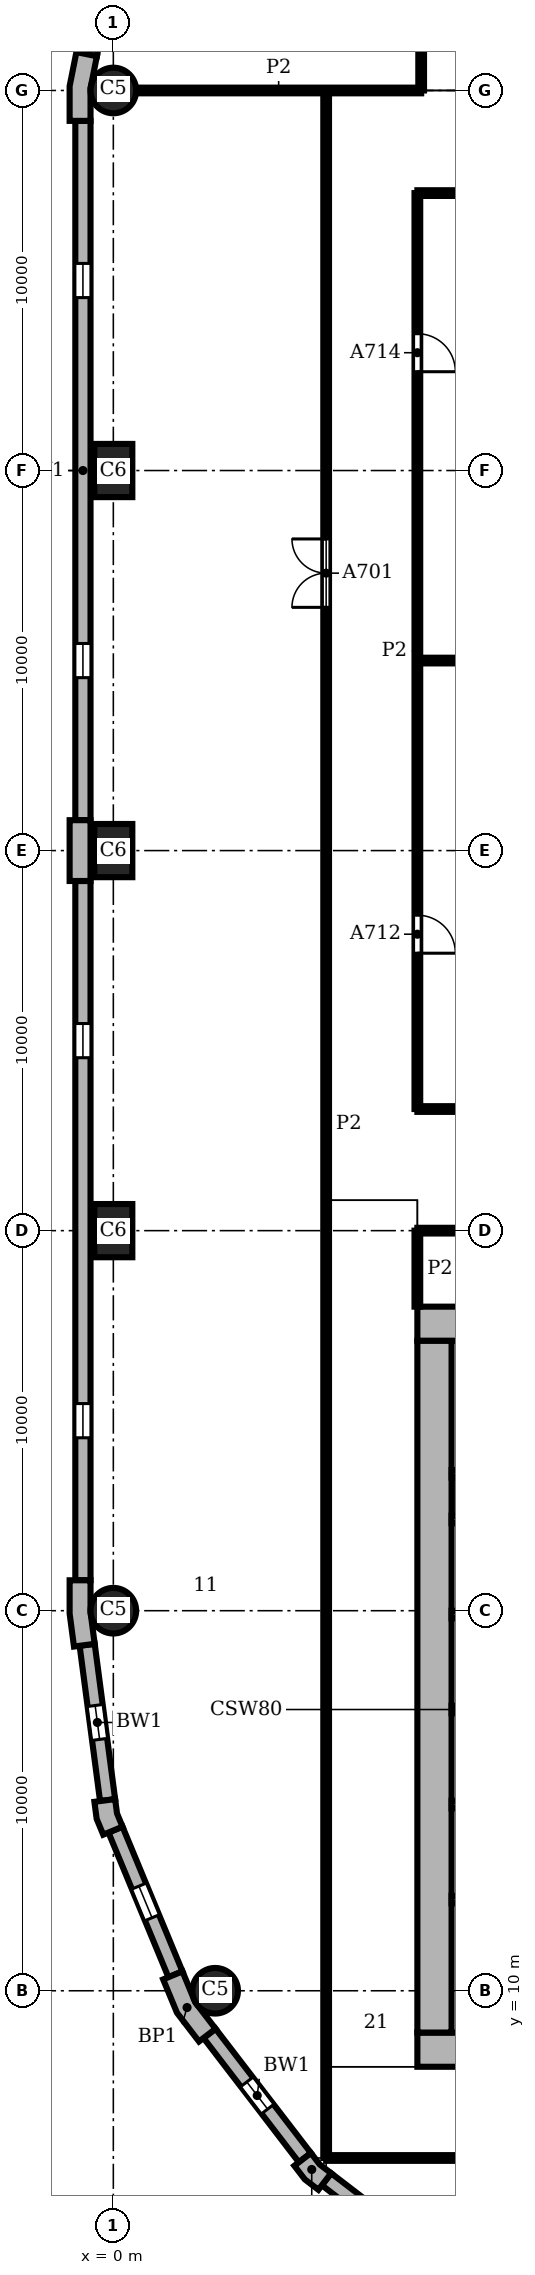
"""IFC4 building model, lengths in metres.
Left out: names, types, materials, properties, quantities, classifications, styles, units other than length and angle.
Written with IfcOpenShell. Run it as: python <this file> out.ifc"""

import sys

from ifc_helpers import new_model, si_unit, direction, frame, frame_2d, origin, origin_2d, place, context, subcontext, project, spatial, polyline, rectangle, circle, outline, extrude, element, fill, save


model = new_model("IFC4")
c1 = context("Model", 3, precision=1e-05, world=origin(), true_north=direction((0.0, 1.0)))
c2 = subcontext(c1, "Body", "Model", "MODEL_VIEW")
j1 = project(units=[si_unit("LENGTHUNIT", "METRE"), si_unit("PLANEANGLEUNIT", "RADIAN")], contexts=[c1])
p1 = place(None, origin())
s1 = spatial("IfcSite", under=j1, at=p1, CompositionType="ELEMENT")
p2 = place(p1, origin())
s2 = spatial("IfcBuilding", under=s1, at=p2, CompositionType="ELEMENT")
p3 = place(p2, frame((0.0, 0.0, 86.1)))
s3 = spatial("IfcBuildingStorey", under=s2, at=p3, CompositionType="ELEMENT", Elevation=86.1)
p4 = place(p3, frame((0.0, 60.0, 0.0), z_axis=(0.0, 0.0, 1.0), x_axis=(1.0, 0.0, 0.0)))
e1 = element("IfcColumn", 1, at=p4, inside=s3, PredefinedType="COLUMN", context=c2, shape_type="SweptSolid", body=[
    extrude(circle(Radius=0.6, at=origin_2d()), origin(), (0.0, 0.0, 1.0), 3.9),
])
for number, where, z_axis, x_axis in (
    (2, (0.0, 50.0, 0.0), (0.0, 0.0, 1.0), (0.0, 1.0, 0.0)),
    (3, (0.0, 40.0, 0.0), (0.0, 0.0, 1.0), (0.0, 1.0, 0.0)),
    (4, (0.0, 30.0, 0.0), (0.0, 0.0, 1.0), (0.0, 1.0, 0.0)),
):
    element("IfcColumn", number, at=place(p3, frame(where, z_axis=z_axis, x_axis=x_axis)), inside=s3, PredefinedType="COLUMN", context=c2, shape_type="SweptSolid", body=[
        extrude(rectangle(XDim=1.4, YDim=1.0, at=origin_2d()), origin(), (0.0, 0.0, 1.0), 3.9),
    ])
for number, where, z_axis, x_axis in (
    (5, (0.0, 20.0, 0.0), (0.0, 0.0, 1.0), (1.0, 0.0, 0.0)),
    (6, (2.679, 10.0, 0.0), (0.0, 0.0, 1.0), (1.0, 0.0, 0.0)),
):
    element("IfcColumn", number, at=place(p3, frame(where, z_axis=z_axis, x_axis=x_axis)), inside=s3, PredefinedType="COLUMN", context=c2, shape_type="SweptSolid", body=[
        extrude(circle(Radius=0.6, at=origin_2d()), origin(), (0.0, 0.0, 1.0), 3.9),
    ])
for number, where, z_axis, x_axis in (
    (7, (8.0, 8.45, 0.0), (0.0, 0.0, 1.0), (1.0, 0.0, 0.0)),
    (8, (28.0, 27.55, 0.0), (0.0, 0.0, 1.0), (-1.0, 0.0, 0.0)),
):
    element("IfcWall", number, at=place(p3, frame(where, z_axis=z_axis, x_axis=x_axis)), inside=s3, PredefinedType="SHEAR", context=c2, shape_type="SweptSolid", body=[
        extrude(rectangle(XDim=20.0, YDim=0.9, at=frame_2d((10.0, 0.0))), origin(), (0.0, 0.0, 1.0), 3.9),
    ])
p5 = place(p3, frame((8.45, 27.1, 0.0), z_axis=(0.0, 0.0, 1.0), x_axis=(0.0, -1.0, 0.0)))
e9 = element("IfcWall", 9, at=p5, inside=s3, PredefinedType="SHEAR", context=c2, shape_type="SweptSolid", body=[
    extrude(rectangle(XDim=18.2, YDim=0.9, at=frame_2d((9.1, 0.0))), origin(), (0.0, 0.0, 1.0), 3.9),
])
p6 = place(p3, origin())
e10 = element("IfcWall", 10, at=p6, inside=s3, PredefinedType="SOLIDWALL", context=c2, shape_type="SweptSolid", body=[
    extrude(outline(polyline([(-0.825, 60.98), (-0.972, 61.009), (-1.15, 60.113), (-1.15, 59.2), (-1.0, 59.2), (-0.6, 59.2), (-0.6, 60.059), (-0.432, 60.902), (-0.825, 60.98)])), origin(), (0.0, 0.0, 1.0), 3.9),
])
e11 = element("IfcWall", 11, at=p6, inside=s3, PredefinedType="SOLIDWALL", context=c2, shape_type="SweptSolid", body=[
    extrude(outline(polyline([(-1.0, 40.8), (-1.15, 40.8), (-1.15, 40.0), (-1.15, 39.2), (-1.0, 39.2), (-0.6, 39.2), (-0.6, 40.0), (-0.6, 40.8), (-1.0, 40.8)])), origin(), (0.0, 0.0, 1.0), 3.9),
])
e12 = element("IfcWall", 12, at=p6, inside=s3, PredefinedType="SOLIDWALL", context=c2, shape_type="SweptSolid", body=[
    extrude(outline(polyline([(-1.0, 20.8), (-1.15, 20.8), (-1.15, 19.925), (-1.036, 19.057), (-0.887, 19.076), (-0.49, 19.128), (-0.6, 19.961), (-0.6, 20.8), (-1.0, 20.8)])), origin(), (0.0, 0.0, 1.0), 3.9),
])
e13 = element("IfcWall", 13, at=p6, inside=s3, PredefinedType="SOLIDWALL", context=c2, shape_type="SweptSolid", body=[
    extrude(outline(polyline([(-0.349, 14.99), (-0.498, 14.971), (-0.439, 14.523), (-0.266, 14.106), (-0.128, 14.164), (0.242, 14.317), (0.097, 14.667), (0.047, 15.043), (-0.349, 14.99)])), origin(), (0.0, 0.0, 1.0), 3.9),
])
e14 = element("IfcWall", 14, at=p6, inside=s3, PredefinedType="SOLIDWALL", context=c2, shape_type="SweptSolid", body=[
    extrude(outline(polyline([(1.449, 10.356), (1.311, 10.299), (1.675, 9.42), (2.254, 8.665), (2.373, 8.757), (2.69, 9.0), (2.155, 9.698), (1.819, 10.51), (1.449, 10.356)])), origin(), (0.0, 0.0, 1.0), 3.9),
])
e15 = element("IfcWall", 15, at=p6, inside=s3, PredefinedType="SOLIDWALL", context=c2, shape_type="SweptSolid", body=[
    extrude(outline(polyline([(4.882, 5.487), (4.763, 5.396), (5.038, 5.038), (5.396, 4.763), (5.487, 4.882), (5.731, 5.199), (5.43, 5.43), (5.199, 5.731), (4.882, 5.487)])), origin(), (0.0, 0.0, 1.0), 3.9),
])
p7 = place(p3, frame((0.299, 65.602, 0.0), z_axis=(0.0, 0.0, 1.0), x_axis=(-0.195098533057, -0.98078364709, 0.0)))
e16 = element("IfcWall", 16, at=p7, inside=s3, PredefinedType="SOLIDWALL", context=c2, shape_type="SweptSolid", body=[
    extrude(rectangle(XDim=4.753, YDim=0.4, at=frame_2d((2.376, 0.0))), origin(), (0.0, 0.0, 1.0), 3.9),
])
p8 = place(p7, frame((0.226, 0.0, 0.9)))
e17 = element("IfcOpeningElement", 17, at=p8, cuts=e16, PredefinedType="OPENING", context=c2, shape_type="SweptSolid", body=[
    extrude(rectangle(XDim=4.3, YDim=2.35, at=frame_2d((2.15, 1.175))), frame((0.0, 0.21, 0.0), z_axis=(0.0, -1.0, 0.0), x_axis=(1.0, 0.0, 0.0)), (0.0, 0.0, 1.0), 0.42),
])
p9 = place(p3, frame((-0.8, 59.2, 0.0), z_axis=(0.0, 0.0, 1.0), x_axis=(0.0, -1.0, 0.0)))
e18 = element("IfcWall", 18, at=p9, inside=s3, PredefinedType="SOLIDWALL", context=c2, shape_type="SweptSolid", body=[
    extrude(rectangle(XDim=18.4, YDim=0.4, at=frame_2d((9.2, 0.0))), origin(), (0.0, 0.0, 1.0), 3.9),
])
p10 = place(p9, frame((3.75, 0.0, 0.9)))
e19 = element("IfcOpeningElement", 19, at=p10, cuts=e18, PredefinedType="OPENING", context=c2, shape_type="SweptSolid", body=[
    extrude(rectangle(XDim=0.9, YDim=2.35, at=frame_2d((0.45, 1.175))), frame((0.0, 0.21, 0.0), z_axis=(0.0, -1.0, 0.0), x_axis=(1.0, 0.0, 0.0)), (0.0, 0.0, 1.0), 0.42),
])
p11 = place(p9, frame((13.75, 0.0, 0.9)))
e20 = element("IfcOpeningElement", 20, at=p11, cuts=e18, PredefinedType="OPENING", context=c2, shape_type="SweptSolid", body=[
    extrude(rectangle(XDim=0.9, YDim=2.35, at=frame_2d((0.45, 1.175))), frame((0.0, 0.21, 0.0), z_axis=(0.0, -1.0, 0.0), x_axis=(1.0, 0.0, 0.0)), (0.0, 0.0, 1.0), 0.42),
])
p12 = place(p3, frame((-0.8, 39.2, 0.0), z_axis=(0.0, 0.0, 1.0), x_axis=(0.0, -1.0, 0.0)))
e21 = element("IfcWall", 21, at=p12, inside=s3, PredefinedType="SOLIDWALL", context=c2, shape_type="SweptSolid", body=[
    extrude(rectangle(XDim=18.4, YDim=0.4, at=frame_2d((9.2, 0.0))), origin(), (0.0, 0.0, 1.0), 3.9),
])
p13 = place(p12, frame((3.75, 0.0, 0.9)))
e22 = element("IfcOpeningElement", 22, at=p13, cuts=e21, PredefinedType="OPENING", context=c2, shape_type="SweptSolid", body=[
    extrude(rectangle(XDim=0.9, YDim=2.35, at=frame_2d((0.45, 1.175))), frame((0.0, 0.21, 0.0), z_axis=(0.0, -1.0, 0.0), x_axis=(1.0, 0.0, 0.0)), (0.0, 0.0, 1.0), 0.42),
])
p14 = place(p12, frame((13.75, 0.0, 0.9)))
e23 = element("IfcOpeningElement", 23, at=p14, cuts=e21, PredefinedType="OPENING", context=c2, shape_type="SweptSolid", body=[
    extrude(rectangle(XDim=0.9, YDim=2.35, at=frame_2d((0.45, 1.175))), frame((0.0, 0.21, 0.0), z_axis=(0.0, -1.0, 0.0), x_axis=(1.0, 0.0, 0.0)), (0.0, 0.0, 1.0), 0.42),
])
p15 = place(p3, frame((-0.689, 19.102, 0.0), z_axis=(0.0, 0.0, 1.0), x_axis=(0.130514280502, -0.991446429508, 0.0)))
e24 = element("IfcWall", 24, at=p15, inside=s3, PredefinedType="SOLIDWALL", context=c2, shape_type="SweptSolid", body=[
    extrude(rectangle(XDim=4.121, YDim=0.4, at=frame_2d((2.061, 0.0))), origin(), (0.0, 0.0, 1.0), 3.9),
])
p16 = place(p15, frame((1.611, 0.0, 0.9)))
e25 = element("IfcOpeningElement", 25, at=p16, cuts=e24, PredefinedType="OPENING", context=c2, shape_type="SweptSolid", body=[
    extrude(rectangle(XDim=0.9, YDim=2.35, at=frame_2d((0.45, 1.175))), frame((0.0, 0.21, 0.0), z_axis=(0.0, -1.0, 0.0), x_axis=(1.0, 0.0, 0.0)), (0.0, 0.0, 1.0), 0.42),
])
p17 = place(p3, frame((0.057, 14.24, 0.0), z_axis=(0.0, 0.0, 1.0), x_axis=(0.382721546029, -0.923863744394, 0.0)))
e26 = element("IfcWall", 26, at=p17, inside=s3, PredefinedType="SOLIDWALL", context=c2, shape_type="SweptSolid", body=[
    extrude(rectangle(XDim=4.121, YDim=0.4, at=frame_2d((2.061, 0.0))), origin(), (0.0, 0.0, 1.0), 3.9),
])
p18 = place(p17, frame((1.611, 0.0, 0.9)))
e27 = element("IfcOpeningElement", 27, at=p18, cuts=e26, PredefinedType="OPENING", context=c2, shape_type="SweptSolid", body=[
    extrude(rectangle(XDim=0.9, YDim=2.35, at=frame_2d((0.45, 1.175))), frame((0.0, 0.21, 0.0), z_axis=(0.0, -1.0, 0.0), x_axis=(1.0, 0.0, 0.0)), (0.0, 0.0, 1.0), 0.42),
])
p19 = place(p3, frame((2.532, 8.878, 0.0), z_axis=(0.0, 0.0, 1.0), x_axis=(0.608759824817, -0.793354571229, 0.0)))
e28 = element("IfcWall", 28, at=p19, inside=s3, PredefinedType="SOLIDWALL", context=c2, shape_type="SweptSolid", body=[
    extrude(rectangle(XDim=4.121, YDim=0.4, at=frame_2d((2.061, 0.0))), origin(), (0.0, 0.0, 1.0), 3.9),
])
p20 = place(p19, frame((1.611, 0.0, 0.9)))
e29 = element("IfcOpeningElement", 29, at=p20, cuts=e28, PredefinedType="OPENING", context=c2, shape_type="SweptSolid", body=[
    extrude(rectangle(XDim=0.9, YDim=2.35, at=frame_2d((0.45, 1.175))), frame((0.0, 0.21, 0.0), z_axis=(0.0, -1.0, 0.0), x_axis=(1.0, 0.0, 0.0)), (0.0, 0.0, 1.0), 0.42),
])
p21 = place(p3, frame((5.609, 5.041, 0.0), z_axis=(0.0, 0.0, 1.0), x_axis=(0.793354571229, -0.608759824817, 0.0)))
e30 = element("IfcWall", 30, at=p21, inside=s3, PredefinedType="SOLIDWALL", context=c2, shape_type="SweptSolid", body=[
    extrude(rectangle(XDim=4.121, YDim=0.4, at=frame_2d((2.061, 0.0))), origin(), (0.0, 0.0, 1.0), 3.9),
])
p22 = place(p21, frame((1.611, 0.0, 0.9)))
e31 = element("IfcOpeningElement", 31, at=p22, cuts=e30, PredefinedType="OPENING", context=c2, shape_type="SweptSolid", body=[
    extrude(rectangle(XDim=0.9, YDim=2.35, at=frame_2d((0.45, 1.175))), frame((0.0, 0.21, 0.0), z_axis=(0.0, -1.0, 0.0), x_axis=(1.0, 0.0, 0.0)), (0.0, 0.0, 1.0), 0.42),
])
p23 = place(p3, frame((8.9, 12.4, 0.0), z_axis=(0.0, 0.0, 1.0), x_axis=(1.0, 0.0, 0.0)))
e32 = element("IfcWall", 32, at=p23, inside=s3, PredefinedType="SHEAR", context=c2, shape_type="SweptSolid", body=[
    extrude(rectangle(XDim=4.9, YDim=0.2, at=frame_2d((2.45, 0.0))), origin(), (0.0, 0.0, 1.0), 3.58),
])
for number, where, z_axis, x_axis in (
    (33, (8.9, 14.9, 0.0), (0.0, 0.0, 1.0), (1.0, 0.0, 0.0)),
    (34, (8.9, 17.4, 0.0), (0.0, 0.0, 1.0), (1.0, 0.0, 0.0)),
    (35, (8.9, 19.9, 0.0), (0.0, 0.0, 1.0), (1.0, 0.0, 0.0)),
    (36, (8.9, 22.4, 0.0), (0.0, 0.0, 1.0), (1.0, 0.0, 0.0)),
):
    element("IfcWall", number, at=place(p3, frame(where, z_axis=z_axis, x_axis=x_axis)), inside=s3, PredefinedType="SHEAR", context=c2, shape_type="SweptSolid", body=[
        extrude(rectangle(XDim=2.8, YDim=0.2, at=frame_2d((1.4, 0.0))), origin(), (0.0, 0.0, 1.0), 3.58),
    ])
p24 = place(p3, frame((8.9, 23.6, 0.0), z_axis=(0.0, 0.0, 1.0), x_axis=(1.0, 0.0, 0.0)))
e37 = element("IfcWall", 37, at=p24, inside=s3, PredefinedType="SHEAR", context=c2, shape_type="SweptSolid", body=[
    extrude(rectangle(XDim=4.9, YDim=0.2, at=frame_2d((2.45, 0.0))), origin(), (0.0, 0.0, 1.0), 3.58),
])
p25 = place(p3, frame((5.6, 5.6, 0.0), z_axis=(0.0, 0.0, 1.0), x_axis=(0.0, 1.0, 0.0)))
e38 = element("IfcWall", 38, at=p25, inside=s3, PredefinedType="PARTITIONING", context=c2, shape_type="SweptSolid", body=[
    extrude(rectangle(XDim=54.4, YDim=0.15, at=frame_2d((27.2, 0.0))), origin(), (0.0, 0.0, 1.0), 3.58),
])
p26 = place(p25, frame((40.8, 0.0, 0.0)))
e39 = element("IfcOpeningElement", 39, at=p26, cuts=e38, PredefinedType="OPENING", context=c2, shape_type="SweptSolid", body=[
    extrude(rectangle(XDim=1.8, YDim=2.1, at=frame_2d((0.9, 1.05))), frame((0.0, 0.085, 0.0), z_axis=(0.0, -1.0, 0.0), x_axis=(1.0, 0.0, 0.0)), (0.0, 0.0, 1.0), 0.17),
])
p27 = place(p3, frame((8.0, 28.0, 0.0), z_axis=(0.0, 0.0, 1.0), x_axis=(0.0, 1.0, 0.0)))
e40 = element("IfcWall", 40, at=p27, inside=s3, PredefinedType="PARTITIONING", context=c2, shape_type="SweptSolid", body=[
    extrude(rectangle(XDim=2.0, YDim=0.15, at=frame_2d((1.0, 0.0))), origin(), (0.0, 0.0, 1.0), 3.58),
])
p28 = place(p3, frame((8.0, 33.2, 0.0), z_axis=(0.0, 0.0, 1.0), x_axis=(0.0, 1.0, 0.0)))
e41 = element("IfcWall", 41, at=p28, inside=s3, PredefinedType="PARTITIONING", context=c2, shape_type="SweptSolid", body=[
    extrude(rectangle(XDim=24.1, YDim=0.15, at=frame_2d((12.05, 0.0))), origin(), (0.0, 0.0, 1.0), 3.58),
])
p29 = place(p28, frame((4.1, 0.0, 0.0)))
e42 = element("IfcOpeningElement", 42, at=p29, cuts=e41, PredefinedType="OPENING", context=c2, shape_type="SweptSolid", body=[
    extrude(rectangle(XDim=1.0, YDim=2.1, at=frame_2d((0.5, 1.05))), frame((0.0, 0.085, 0.0), z_axis=(0.0, -1.0, 0.0), x_axis=(1.0, 0.0, 0.0)), (0.0, 0.0, 1.0), 0.17),
])
p30 = place(p28, frame((19.4, 0.0, 0.0)))
e43 = element("IfcOpeningElement", 43, at=p30, cuts=e41, PredefinedType="OPENING", context=c2, shape_type="SweptSolid", body=[
    extrude(rectangle(XDim=1.0, YDim=2.1, at=frame_2d((0.5, 1.05))), frame((0.0, 0.085, 0.0), z_axis=(0.0, -1.0, 0.0), x_axis=(1.0, 0.0, 0.0)), (0.0, 0.0, 1.0), 0.17),
])
p31 = place(p3, frame((8.1, 60.0, 0.0), z_axis=(0.0, 0.0, 1.0), x_axis=(0.0, 1.0, 0.0)))
e44 = element("IfcWall", 44, at=p31, inside=s3, PredefinedType="PARTITIONING", context=c2, shape_type="SweptSolid", body=[
    extrude(rectangle(XDim=6.4, YDim=0.15, at=frame_2d((3.2, 0.0))), origin(), (0.0, 0.0, 1.0), 3.58),
])
p32 = place(p31, frame((2.85, 0.0, 0.0)))
e45 = element("IfcOpeningElement", 45, at=p32, cuts=e44, PredefinedType="OPENING", context=c2, shape_type="SweptSolid", body=[
    extrude(rectangle(XDim=1.0, YDim=2.1, at=frame_2d((0.5, 1.05))), frame((0.0, 0.085, 0.0), z_axis=(0.0, -1.0, 0.0), x_axis=(1.0, 0.0, 0.0)), (0.0, 0.0, 1.0), 0.17),
])
p33 = place(p3, frame((5.6, 5.6, 0.0), z_axis=(0.0, 0.0, 1.0), x_axis=(1.0, 0.0, 0.0)))
e46 = element("IfcWall", 46, at=p33, inside=s3, PredefinedType="PARTITIONING", context=c2, shape_type="SweptSolid", body=[
    extrude(rectangle(XDim=25.4, YDim=0.15, at=frame_2d((12.7, 0.0))), origin(), (0.0, 0.0, 1.0), 3.58),
])
p34 = place(p33, frame((4.6, 0.0, 0.0)))
e47 = element("IfcOpeningElement", 47, at=p34, cuts=e46, PredefinedType="OPENING", context=c2, shape_type="SweptSolid", body=[
    extrude(rectangle(XDim=1.0, YDim=2.1, at=frame_2d((0.5, 1.05))), frame((0.0, 0.085, 0.0), z_axis=(0.0, -1.0, 0.0), x_axis=(1.0, 0.0, 0.0)), (0.0, 0.0, 1.0), 0.17),
])
p35 = place(p33, frame((11.0, 0.0, 0.0)))
e48 = element("IfcOpeningElement", 48, at=p35, cuts=e46, PredefinedType="OPENING", context=c2, shape_type="SweptSolid", body=[
    extrude(rectangle(XDim=0.8, YDim=2.1, at=frame_2d((0.4, 1.05))), frame((0.0, 0.085, 0.0), z_axis=(0.0, -1.0, 0.0), x_axis=(1.0, 0.0, 0.0)), (0.0, 0.0, 1.0), 0.17),
])
p36 = place(p33, frame((20.0, 0.0, 0.0)))
e49 = element("IfcOpeningElement", 49, at=p36, cuts=e46, PredefinedType="OPENING", context=c2, shape_type="SweptSolid", body=[
    extrude(rectangle(XDim=1.0, YDim=2.1, at=frame_2d((0.5, 1.05))), frame((0.0, 0.085, 0.0), z_axis=(0.0, -1.0, 0.0), x_axis=(1.0, 0.0, 0.0)), (0.0, 0.0, 1.0), 0.17),
])
p37 = place(p3, frame((8.0, 30.0, 0.0), z_axis=(0.0, 0.0, 1.0), x_axis=(1.0, 0.0, 0.0)))
e50 = element("IfcWall", 50, at=p37, inside=s3, PredefinedType="PARTITIONING", context=c2, shape_type="SweptSolid", body=[
    extrude(rectangle(XDim=1.2, YDim=0.15, at=frame_2d((0.6, 0.0))), origin(), (0.0, 0.0, 1.0), 3.58),
])
for number, where, z_axis, x_axis in (
    (51, (8.0, 33.2, 0.0), (0.0, 0.0, 1.0), (1.0, 0.0, 0.0)),
    (52, (8.0, 45.0, 0.0), (0.0, 0.0, 1.0), (1.0, 0.0, 0.0)),
    (53, (8.0, 57.3, 0.0), (0.0, 0.0, 1.0), (1.0, 0.0, 0.0)),
):
    element("IfcWall", number, at=place(p3, frame(where, z_axis=z_axis, x_axis=x_axis)), inside=s3, PredefinedType="PARTITIONING", context=c2, shape_type="SweptSolid", body=[
        extrude(rectangle(XDim=5.8, YDim=0.15, at=frame_2d((2.9, 0.0))), origin(), (0.0, 0.0, 1.0), 3.58),
    ])
p38 = place(p3, frame((0.6, 60.0, 0.0), z_axis=(0.0, 0.0, 1.0), x_axis=(1.0, 0.0, 0.0)))
e54 = element("IfcWall", 54, at=p38, inside=s3, PredefinedType="PARTITIONING", context=c2, shape_type="SweptSolid", body=[
    extrude(rectangle(XDim=7.5, YDim=0.15, at=frame_2d((3.75, 0.0))), origin(), (0.0, 0.0, 1.0), 3.58),
])
p39 = place(p10, origin())
e55 = element("IfcWindow", 55, at=p39, inside=s3, PartitioningType="SINGLE_PANEL", PredefinedType="WINDOW", context=c2, shape_type="SweptSolid", body=[
    extrude(rectangle(XDim=0.9, YDim=2.35, at=frame_2d((0.45, 1.175))), frame((0.0, 0.16, 0.0), z_axis=(0.0, -1.0, 0.0), x_axis=(1.0, 0.0, 0.0)), (0.0, 0.0, 1.0), 0.06),
])
fill(e19, e55)
p40 = place(p11, origin())
e56 = element("IfcWindow", 56, at=p40, inside=s3, PartitioningType="SINGLE_PANEL", PredefinedType="WINDOW", context=c2, shape_type="SweptSolid", body=[
    extrude(rectangle(XDim=0.9, YDim=2.35, at=frame_2d((0.45, 1.175))), frame((0.0, 0.16, 0.0), z_axis=(0.0, -1.0, 0.0), x_axis=(1.0, 0.0, 0.0)), (0.0, 0.0, 1.0), 0.06),
])
fill(e20, e56)
p41 = place(p13, origin())
e57 = element("IfcWindow", 57, at=p41, inside=s3, PartitioningType="SINGLE_PANEL", PredefinedType="WINDOW", context=c2, shape_type="SweptSolid", body=[
    extrude(rectangle(XDim=0.9, YDim=2.35, at=frame_2d((0.45, 1.175))), frame((0.0, 0.16, 0.0), z_axis=(0.0, -1.0, 0.0), x_axis=(1.0, 0.0, 0.0)), (0.0, 0.0, 1.0), 0.06),
])
fill(e22, e57)
p42 = place(p14, origin())
e58 = element("IfcWindow", 58, at=p42, inside=s3, PartitioningType="SINGLE_PANEL", PredefinedType="WINDOW", context=c2, shape_type="SweptSolid", body=[
    extrude(rectangle(XDim=0.9, YDim=2.35, at=frame_2d((0.45, 1.175))), frame((0.0, 0.16, 0.0), z_axis=(0.0, -1.0, 0.0), x_axis=(1.0, 0.0, 0.0)), (0.0, 0.0, 1.0), 0.06),
])
fill(e23, e58)
p43 = place(p16, origin())
e59 = element("IfcWindow", 59, at=p43, inside=s3, PartitioningType="SINGLE_PANEL", PredefinedType="WINDOW", context=c2, shape_type="SweptSolid", body=[
    extrude(rectangle(XDim=0.9, YDim=2.35, at=frame_2d((0.45, 1.175))), frame((0.0, 0.16, 0.0), z_axis=(0.0, -1.0, 0.0), x_axis=(1.0, 0.0, 0.0)), (0.0, 0.0, 1.0), 0.06),
])
fill(e25, e59)
p44 = place(p18, origin())
e60 = element("IfcWindow", 60, at=p44, inside=s3, PartitioningType="SINGLE_PANEL", PredefinedType="WINDOW", context=c2, shape_type="SweptSolid", body=[
    extrude(rectangle(XDim=0.9, YDim=2.35, at=frame_2d((0.45, 1.175))), frame((0.0, 0.16, 0.0), z_axis=(0.0, -1.0, 0.0), x_axis=(1.0, 0.0, 0.0)), (0.0, 0.0, 1.0), 0.06),
])
fill(e27, e60)
p45 = place(p20, origin())
e61 = element("IfcWindow", 61, at=p45, inside=s3, PartitioningType="SINGLE_PANEL", PredefinedType="WINDOW", context=c2, shape_type="SweptSolid", body=[
    extrude(rectangle(XDim=0.9, YDim=2.35, at=frame_2d((0.45, 1.175))), frame((0.0, 0.16, 0.0), z_axis=(0.0, -1.0, 0.0), x_axis=(1.0, 0.0, 0.0)), (0.0, 0.0, 1.0), 0.06),
])
fill(e29, e61)
p46 = place(p26, origin())
e62 = element("IfcDoor", 62, at=p46, inside=s3, OperationType="DOUBLE_DOOR_SINGLE_SWING", PredefinedType="DOOR", context=c2, shape_type="SweptSolid", body=[
    extrude(rectangle(XDim=1.8, YDim=2.1, at=frame_2d((0.9, 1.05))), frame((0.0, 0.025, 0.0), z_axis=(0.0, -1.0, 0.0), x_axis=(1.0, 0.0, 0.0)), (0.0, 0.0, 1.0), 0.05),
])
fill(e39, e62)
p47 = place(p29, frame((1.0, 0.0, 0.0), z_axis=(0.0, 0.0, 1.0), x_axis=(-1.0, 0.0, 0.0)))
e63 = element("IfcDoor", 63, at=p47, inside=s3, OperationType="SINGLE_SWING_RIGHT", PredefinedType="DOOR", context=c2, shape_type="SweptSolid", body=[
    extrude(rectangle(XDim=1.0, YDim=2.1, at=frame_2d((0.5, 1.05))), frame((0.0, 0.025, 0.0), z_axis=(0.0, -1.0, 0.0), x_axis=(1.0, 0.0, 0.0)), (0.0, 0.0, 1.0), 0.05),
])
fill(e42, e63)
p48 = place(p30, frame((1.0, 0.0, 0.0), z_axis=(0.0, 0.0, 1.0), x_axis=(-1.0, 0.0, 0.0)))
e64 = element("IfcDoor", 64, at=p48, inside=s3, OperationType="SINGLE_SWING_RIGHT", PredefinedType="DOOR", context=c2, shape_type="SweptSolid", body=[
    extrude(rectangle(XDim=1.0, YDim=2.1, at=frame_2d((0.5, 1.05))), frame((0.0, 0.025, 0.0), z_axis=(0.0, -1.0, 0.0), x_axis=(1.0, 0.0, 0.0)), (0.0, 0.0, 1.0), 0.05),
])
fill(e43, e64)
save(model, sys.argv[1])
